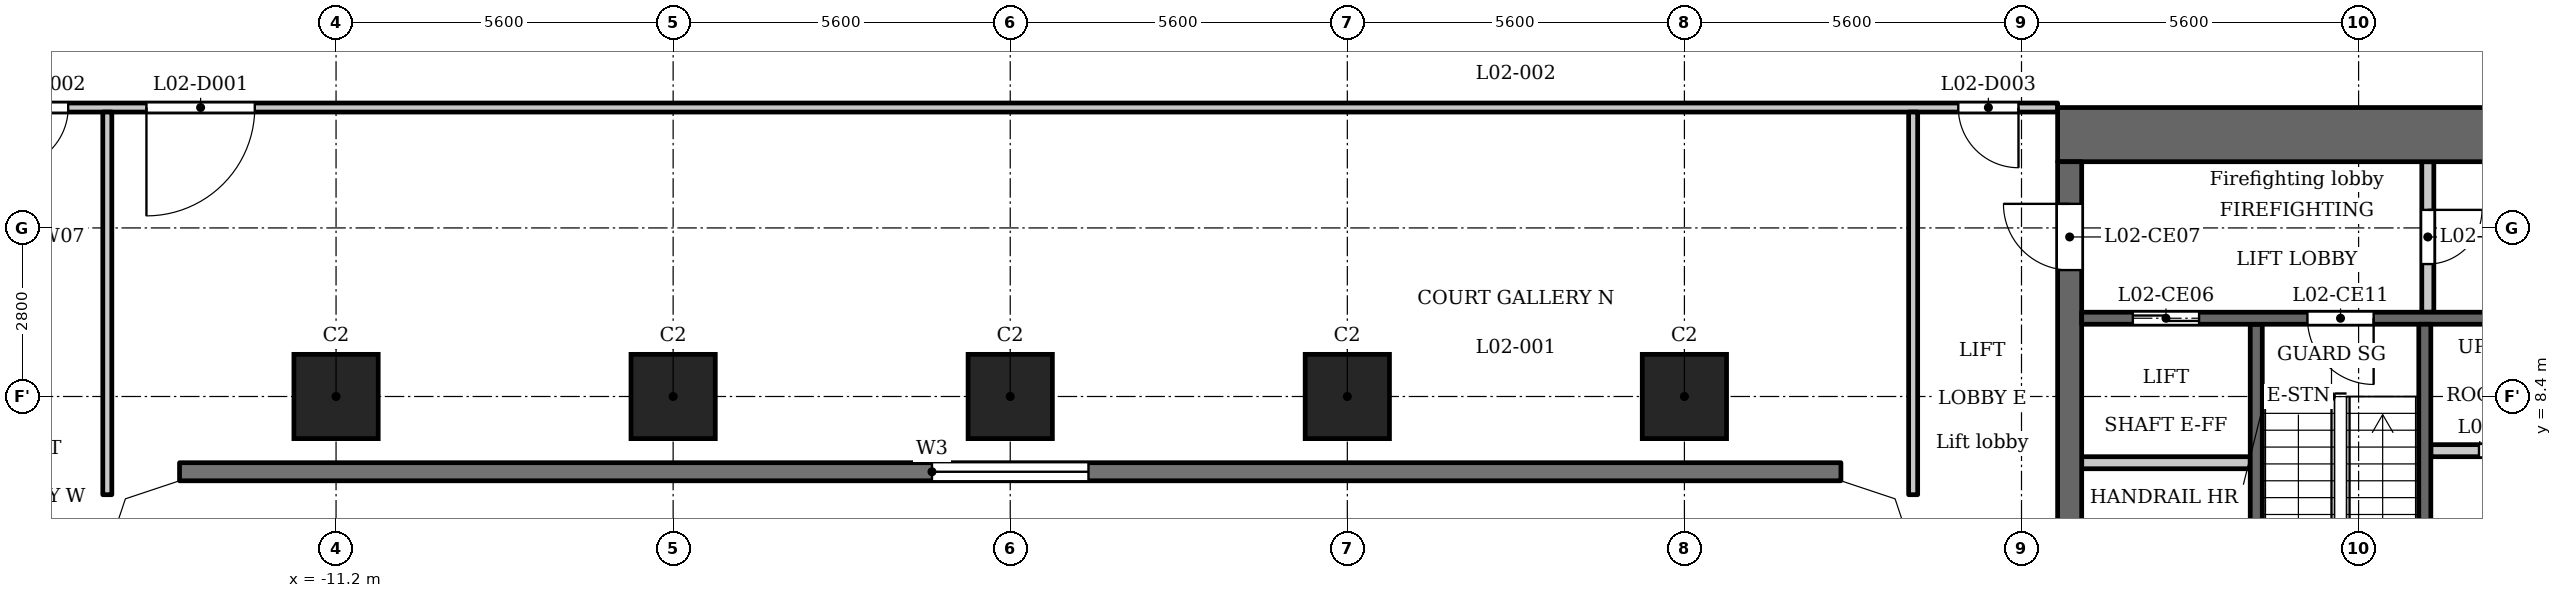
"""IFC4 building model, lengths in metres.
Left out: names, types, materials, properties, quantities, classifications, styles, units other than length and angle.
Written with IfcOpenShell. Run it as: python <this file> out.ifc"""

import sys

from ifc_helpers import new_model, si_unit, direction, frame, frame_2d, origin, origin_2d, place, context, subcontext, project, spatial, polyline, rectangle, outline, extrude, element, fill, save


model = new_model("IFC4")
c1 = context("Model", 3, precision=1e-05, world=origin(), true_north=direction((0.0, 1.0)))
c2 = subcontext(c1, "Body", "Model", "MODEL_VIEW")
j1 = project(units=[si_unit("LENGTHUNIT", "METRE"), si_unit("PLANEANGLEUNIT", "RADIAN")], contexts=[c1])
p1 = place(None, origin())
s1 = spatial("IfcSite", under=j1, at=p1, CompositionType="ELEMENT")
p2 = place(p1, origin())
s2 = spatial("IfcBuilding", under=s1, at=p2, CompositionType="ELEMENT")
p3 = place(p2, frame((0.0, 0.0, 11.3)))
s3 = spatial("IfcBuildingStorey", under=s2, at=p3, CompositionType="ELEMENT", Elevation=11.3)
for number, where, z_axis, x_axis in (
    (1, (-11.2, 8.4, 0.0), (0.0, 0.0, 1.0), (1.0, 0.0, 0.0)),
    (2, (-5.6, 8.4, 0.0), (0.0, 0.0, 1.0), (1.0, 0.0, 0.0)),
    (3, (0.0, 8.4, 0.0), (0.0, 0.0, 1.0), (1.0, 0.0, 0.0)),
    (4, (5.6, 8.4, 0.0), (0.0, 0.0, 1.0), (1.0, 0.0, 0.0)),
    (5, (11.2, 8.4, 0.0), (0.0, 0.0, 1.0), (1.0, 0.0, 0.0)),
):
    element("IfcColumn", number, at=place(p3, frame(where, z_axis=z_axis, x_axis=x_axis)), inside=s3, PredefinedType="COLUMN", context=c2, shape_type="SweptSolid", body=[
        extrude(rectangle(XDim=1.4, YDim=1.4, at=origin_2d()), origin(), (0.0, 0.0, 1.0), 4.8),
    ])
p4 = place(p3, frame((-13.8, 7.15, 0.0), z_axis=(0.0, 0.0, 1.0), x_axis=(1.0, 0.0, 0.0)))
e6 = element("IfcWall", 6, at=p4, inside=s3, PredefinedType="SOLIDWALL", context=c2, shape_type="SweptSolid", body=[
    extrude(rectangle(XDim=27.6, YDim=0.3, at=frame_2d((13.8, 0.0))), origin(), (0.0, 0.0, 1.0), 4.45),
])
p5 = place(p4, frame((12.5, 0.0, 0.9)))
e7 = element("IfcOpeningElement", 7, at=p5, cuts=e6, PredefinedType="OPENING", context=c2, shape_type="SweptSolid", body=[
    extrude(rectangle(XDim=2.6, YDim=1.25, at=frame_2d((1.3, 0.625))), frame((0.0, 0.16, 0.0), z_axis=(0.0, -1.0, 0.0), x_axis=(1.0, 0.0, 0.0)), (0.0, 0.0, 1.0), 0.32),
])
p6 = place(p3, frame((20.7, 2.6, 0.0), z_axis=(0.0, 0.0, 1.0), x_axis=(0.0, 1.0, 0.0)))
e8 = element("IfcWall", 8, at=p6, inside=s3, PredefinedType="SHEAR", context=c2, shape_type="SweptSolid", body=[
    extrude(rectangle(XDim=7.0, YDim=0.2, at=frame_2d((3.5, 0.0))), origin(), (0.0, 0.0, 1.0), 4.45),
])
p7 = place(p3, frame((17.4, 12.75, 0.0), z_axis=(0.0, 0.0, 1.0), x_axis=(1.0, 0.0, 0.0)))
e9 = element("IfcWall", 9, at=p7, inside=s3, PredefinedType="SHEAR", context=c2, shape_type="SweptSolid", body=[
    extrude(rectangle(XDim=10.4, YDim=0.9, at=frame_2d((5.2, 0.0))), origin(), (0.0, 0.0, 1.0), 4.45),
])
p8 = place(p3, frame((17.6, -12.3, 0.0), z_axis=(0.0, 0.0, 1.0), x_axis=(0.0, 1.0, 0.0)))
e10 = element("IfcWall", 10, at=p8, inside=s3, PredefinedType="SHEAR", context=c2, shape_type="SweptSolid", body=[
    extrude(rectangle(XDim=24.6, YDim=0.4, at=frame_2d((12.3, 0.0))), origin(), (0.0, 0.0, 1.0), 4.45),
])
p9 = place(p8, frame((6.0, 0.0, 0.0)))
e11 = element("IfcOpeningElement", 11, at=p9, cuts=e10, PredefinedType="OPENING", context=c2, shape_type="SweptSolid", body=[
    extrude(rectangle(XDim=1.1, YDim=2.1, at=frame_2d((0.55, 1.05))), frame((0.0, 0.21, 0.0), z_axis=(0.0, -1.0, 0.0), x_axis=(1.0, 0.0, 0.0)), (0.0, 0.0, 1.0), 0.42),
])
p10 = place(p8, frame((8.4, 0.0, 0.0)))
e12 = element("IfcOpeningElement", 12, at=p10, cuts=e10, PredefinedType="OPENING", context=c2, shape_type="SweptSolid", body=[
    extrude(rectangle(XDim=1.1, YDim=2.1, at=frame_2d((0.55, 1.05))), frame((0.0, 0.21, 0.0), z_axis=(0.0, -1.0, 0.0), x_axis=(1.0, 0.0, 0.0)), (0.0, 0.0, 1.0), 0.42),
])
p11 = place(p8, frame((10.8, 0.0, 0.0)))
e13 = element("IfcOpeningElement", 13, at=p11, cuts=e10, PredefinedType="OPENING", context=c2, shape_type="SweptSolid", body=[
    extrude(rectangle(XDim=1.1, YDim=2.1, at=frame_2d((0.55, 1.05))), frame((0.0, 0.21, 0.0), z_axis=(0.0, -1.0, 0.0), x_axis=(1.0, 0.0, 0.0)), (0.0, 0.0, 1.0), 0.42),
])
p12 = place(p8, frame((16.75, 0.0, 0.0)))
e14 = element("IfcOpeningElement", 14, at=p12, cuts=e10, PredefinedType="OPENING", context=c2, shape_type="SweptSolid", body=[
    extrude(rectangle(XDim=0.9, YDim=2.1, at=frame_2d((0.45, 1.05))), frame((0.0, 0.21, 0.0), z_axis=(0.0, -1.0, 0.0), x_axis=(1.0, 0.0, 0.0)), (0.0, 0.0, 1.0), 0.42),
])
p13 = place(p8, frame((22.8, 0.0, 0.0)))
e15 = element("IfcOpeningElement", 15, at=p13, cuts=e10, PredefinedType="OPENING", context=c2, shape_type="SweptSolid", body=[
    extrude(rectangle(XDim=1.1, YDim=2.1, at=frame_2d((0.55, 1.05))), frame((0.0, 0.21, 0.0), z_axis=(0.0, -1.0, 0.0), x_axis=(1.0, 0.0, 0.0)), (0.0, 0.0, 1.0), 0.42),
])
p14 = place(p8, frame((0.7, 0.0, 0.0)))
e16 = element("IfcOpeningElement", 16, at=p14, cuts=e10, PredefinedType="OPENING", context=c2, shape_type="SweptSolid", body=[
    extrude(rectangle(XDim=1.1, YDim=2.1, at=frame_2d((0.55, 1.05))), frame((0.0, 0.21, 0.0), z_axis=(0.0, -1.0, 0.0), x_axis=(1.0, 0.0, 0.0)), (0.0, 0.0, 1.0), 0.42),
])
p15 = place(p8, frame((12.775, 0.0, 0.0)))
e17 = element("IfcOpeningElement", 17, at=p15, cuts=e10, PredefinedType="OPENING", context=c2, shape_type="SweptSolid", body=[
    extrude(rectangle(XDim=1.8, YDim=2.1, at=frame_2d((0.9, 1.05))), frame((0.0, 0.21, 0.0), z_axis=(0.0, -1.0, 0.0), x_axis=(1.0, 0.0, 0.0)), (0.0, 0.0, 1.0), 0.42),
])
p16 = place(p3, frame((23.55, 9.8, 0.0), z_axis=(0.0, 0.0, 1.0), x_axis=(0.0, 1.0, 0.0)))
e18 = element("IfcWall", 18, at=p16, inside=s3, PredefinedType="PARTITIONING", context=c2, shape_type="SweptSolid", body=[
    extrude(rectangle(XDim=2.5, YDim=0.2, at=frame_2d((1.25, 0.0))), origin(), (0.0, 0.0, 1.0), 4.45),
])
p17 = place(p16, frame((0.8, 0.0, 0.0)))
e19 = element("IfcOpeningElement", 19, at=p17, cuts=e18, PredefinedType="OPENING", context=c2, shape_type="SweptSolid", body=[
    extrude(rectangle(XDim=0.9, YDim=2.1, at=frame_2d((0.45, 1.05))), frame((0.0, 0.11, 0.0), z_axis=(0.0, -1.0, 0.0), x_axis=(1.0, 0.0, 0.0)), (0.0, 0.0, 1.0), 0.22),
])
p18 = place(p3, frame((23.6, 7.5, 0.0), z_axis=(0.0, 0.0, 1.0), x_axis=(1.0, 0.0, 0.0)))
e20 = element("IfcWall", 20, at=p18, inside=s3, PredefinedType="PARTITIONING", context=c2, shape_type="SweptSolid", body=[
    extrude(rectangle(XDim=2.5, YDim=0.2, at=frame_2d((1.25, 0.0))), origin(), (0.0, 0.0, 1.0), 4.45),
])
p19 = place(p18, frame((0.8, 0.0, 0.0)))
e21 = element("IfcOpeningElement", 21, at=p19, cuts=e20, PredefinedType="OPENING", context=c2, shape_type="SweptSolid", body=[
    extrude(rectangle(XDim=0.9, YDim=2.1, at=frame_2d((0.45, 1.05))), frame((0.0, 0.11, 0.0), z_axis=(0.0, -1.0, 0.0), x_axis=(1.0, 0.0, 0.0)), (0.0, 0.0, 1.0), 0.22),
])
p20 = place(p3, frame((17.8, 7.3, 0.0), z_axis=(0.0, 0.0, 1.0), x_axis=(1.0, 0.0, 0.0)))
e22 = element("IfcWall", 22, at=p20, inside=s3, PredefinedType="PARTITIONING", context=c2, shape_type="SweptSolid", body=[
    extrude(rectangle(XDim=2.8, YDim=0.2, at=frame_2d((1.4, 0.0))), origin(), (0.0, 0.0, 1.0), 4.45),
])
p21 = place(p3, frame((17.8, 9.7, 0.0), z_axis=(0.0, 0.0, 1.0), x_axis=(1.0, 0.0, 0.0)))
e23 = element("IfcWall", 23, at=p21, inside=s3, PredefinedType="SHEAR", context=c2, shape_type="SweptSolid", body=[
    extrude(rectangle(XDim=8.3, YDim=0.2, at=frame_2d((4.15, 0.0))), origin(), (0.0, 0.0, 1.0), 4.45),
])
p22 = place(p21, frame((0.85, 0.0, 0.0)))
e24 = element("IfcOpeningElement", 24, at=p22, cuts=e23, PredefinedType="OPENING", context=c2, shape_type="SweptSolid", body=[
    extrude(rectangle(XDim=1.1, YDim=2.1, at=frame_2d((0.55, 1.05))), frame((0.0, 0.11, 0.0), z_axis=(0.0, -1.0, 0.0), x_axis=(1.0, 0.0, 0.0)), (0.0, 0.0, 1.0), 0.22),
])
p23 = place(p21, frame((3.75, 0.0, 0.0)))
e25 = element("IfcOpeningElement", 25, at=p23, cuts=e23, PredefinedType="OPENING", context=c2, shape_type="SweptSolid", body=[
    extrude(rectangle(XDim=1.1, YDim=2.1, at=frame_2d((0.55, 1.05))), frame((0.0, 0.11, 0.0), z_axis=(0.0, -1.0, 0.0), x_axis=(1.0, 0.0, 0.0)), (0.0, 0.0, 1.0), 0.22),
])
p24 = place(p3, frame((23.5, 2.6, 0.0), z_axis=(0.0, 0.0, 1.0), x_axis=(0.0, 1.0, 0.0)))
e26 = element("IfcWall", 26, at=p24, inside=s3, PredefinedType="SHEAR", context=c2, shape_type="SweptSolid", body=[
    extrude(rectangle(XDim=7.0, YDim=0.2, at=frame_2d((3.5, 0.0))), origin(), (0.0, 0.0, 1.0), 4.45),
])
p25 = place(p3, frame((-17.4, 13.2, 0.0), z_axis=(0.0, 0.0, 1.0), x_axis=(1.0, 0.0, 0.0)))
e27 = element("IfcWall", 27, at=p25, inside=s3, PredefinedType="PARTITIONING", context=c2, shape_type="SweptSolid", body=[
    extrude(rectangle(XDim=34.8, YDim=0.15, at=frame_2d((17.4, 0.0))), origin(), (0.0, 0.0, 1.0), 4.45),
])
p26 = place(p25, frame((3.05, 0.0, 0.0)))
e28 = element("IfcOpeningElement", 28, at=p26, cuts=e27, PredefinedType="OPENING", context=c2, shape_type="SweptSolid", body=[
    extrude(rectangle(XDim=1.8, YDim=2.1, at=frame_2d((0.9, 1.05))), frame((0.0, 0.085, 0.0), z_axis=(0.0, -1.0, 0.0), x_axis=(1.0, 0.0, 0.0)), (0.0, 0.0, 1.0), 0.17),
])
p27 = place(p25, frame((0.75, 0.0, 0.0)))
e29 = element("IfcOpeningElement", 29, at=p27, cuts=e27, PredefinedType="OPENING", context=c2, shape_type="SweptSolid", body=[
    extrude(rectangle(XDim=1.0, YDim=2.1, at=frame_2d((0.5, 1.05))), frame((0.0, 0.085, 0.0), z_axis=(0.0, -1.0, 0.0), x_axis=(1.0, 0.0, 0.0)), (0.0, 0.0, 1.0), 0.17),
])
p28 = place(p25, frame((33.15, 0.0, 0.0)))
e30 = element("IfcOpeningElement", 30, at=p28, cuts=e27, PredefinedType="OPENING", context=c2, shape_type="SweptSolid", body=[
    extrude(rectangle(XDim=1.0, YDim=2.1, at=frame_2d((0.5, 1.05))), frame((0.0, 0.085, 0.0), z_axis=(0.0, -1.0, 0.0), x_axis=(1.0, 0.0, 0.0)), (0.0, 0.0, 1.0), 0.17),
])
for number, where, z_axis, x_axis in (
    (31, (-15.0, 6.769, 0.0), (0.0, 0.0, 1.0), (0.0, 1.0, 0.0)),
    (32, (15.0, 6.769, 0.0), (0.0, 0.0, 1.0), (0.0, 1.0, 0.0)),
):
    element("IfcWall", number, at=place(p3, frame(where, z_axis=z_axis, x_axis=x_axis)), inside=s3, PredefinedType="PARTITIONING", context=c2, shape_type="SweptSolid", body=[
        extrude(rectangle(XDim=6.356, YDim=0.15, at=frame_2d((3.178, 0.0))), origin(), (0.0, 0.0, 1.0), 4.45),
    ])
p29 = place(p3, origin())
e33 = element("IfcWall", 33, at=p29, inside=s3, PredefinedType="SOLIDWALL", context=c2, shape_type="SweptSolid", body=[
    extrude(outline(polyline([(-13.849, 7.3), (-14.937, 6.937), (-15.3, 5.849), (-15.3, 5.8), (-15.0, 5.8), (-14.7, 6.7), (-13.8, 7.0), (-13.8, 7.3), (-13.849, 7.3)])), origin(), (0.0, 0.0, 1.0), 4.45),
])
e34 = element("IfcWall", 34, at=p29, inside=s3, PredefinedType="SOLIDWALL", context=c2, shape_type="SweptSolid", body=[
    extrude(outline(polyline([(14.937, 6.937), (13.849, 7.3), (13.8, 7.3), (13.8, 7.0), (14.7, 6.7), (15.0, 5.8), (15.3, 5.8), (15.3, 5.849), (14.937, 6.937)])), origin(), (0.0, 0.0, 1.0), 4.45),
])
p30 = place(p22, origin())
e35 = element("IfcDoor", 35, at=p30, inside=s3, OperationType="DOUBLE_DOOR_SLIDING", PredefinedType="DOOR", context=c2, shape_type="SweptSolid", body=[
    extrude(rectangle(XDim=1.1, YDim=2.1, at=frame_2d((0.55, 1.05))), frame((0.0, 0.025, 0.0), z_axis=(0.0, -1.0, 0.0), x_axis=(1.0, 0.0, 0.0)), (0.0, 0.0, 1.0), 0.05),
])
fill(e24, e35)
p31 = place(p13, origin())
e36 = element("IfcDoor", 36, at=p31, inside=s3, OperationType="SINGLE_SWING_LEFT", PredefinedType="DOOR", context=c2, shape_type="SweptSolid", body=[
    extrude(rectangle(XDim=1.1, YDim=2.1, at=frame_2d((0.55, 1.05))), frame((0.0, 0.025, 0.0), z_axis=(0.0, -1.0, 0.0), x_axis=(1.0, 0.0, 0.0)), (0.0, 0.0, 1.0), 0.05),
])
fill(e15, e36)
p32 = place(p17, origin())
e37 = element("IfcDoor", 37, at=p32, inside=s3, OperationType="SINGLE_SWING_RIGHT", PredefinedType="DOOR", context=c2, shape_type="SweptSolid", body=[
    extrude(rectangle(XDim=0.9, YDim=2.1, at=frame_2d((0.45, 1.05))), frame((0.0, 0.025, 0.0), z_axis=(0.0, -1.0, 0.0), x_axis=(1.0, 0.0, 0.0)), (0.0, 0.0, 1.0), 0.05),
])
fill(e19, e37)
p33 = place(p23, origin())
e38 = element("IfcDoor", 38, at=p33, inside=s3, OperationType="SINGLE_SWING_RIGHT", PredefinedType="DOOR", context=c2, shape_type="SweptSolid", body=[
    extrude(rectangle(XDim=1.1, YDim=2.1, at=frame_2d((0.55, 1.05))), frame((0.0, 0.025, 0.0), z_axis=(0.0, -1.0, 0.0), x_axis=(1.0, 0.0, 0.0)), (0.0, 0.0, 1.0), 0.05),
])
fill(e25, e38)
p34 = place(p19, origin())
e39 = element("IfcDoor", 39, at=p34, inside=s3, OperationType="SINGLE_SWING_LEFT", PredefinedType="DOOR", context=c2, shape_type="SweptSolid", body=[
    extrude(rectangle(XDim=0.9, YDim=2.1, at=frame_2d((0.45, 1.05))), frame((0.0, 0.025, 0.0), z_axis=(0.0, -1.0, 0.0), x_axis=(1.0, 0.0, 0.0)), (0.0, 0.0, 1.0), 0.05),
])
fill(e21, e39)
p35 = place(p26, origin())
e40 = element("IfcDoor", 40, at=p35, inside=s3, OperationType="SINGLE_SWING_LEFT", PredefinedType="DOOR", context=c2, shape_type="SweptSolid", body=[
    extrude(rectangle(XDim=1.8, YDim=2.1, at=frame_2d((0.9, 1.05))), frame((0.0, 0.025, 0.0), z_axis=(0.0, -1.0, 0.0), x_axis=(1.0, 0.0, 0.0)), (0.0, 0.0, 1.0), 0.05),
])
fill(e28, e40)
p36 = place(p27, origin())
e41 = element("IfcDoor", 41, at=p36, inside=s3, OperationType="SINGLE_SWING_LEFT", PredefinedType="DOOR", context=c2, shape_type="SweptSolid", body=[
    extrude(rectangle(XDim=1.0, YDim=2.1, at=frame_2d((0.5, 1.05))), frame((0.0, 0.025, 0.0), z_axis=(0.0, -1.0, 0.0), x_axis=(1.0, 0.0, 0.0)), (0.0, 0.0, 1.0), 0.05),
])
fill(e29, e41)
p37 = place(p28, origin())
e42 = element("IfcDoor", 42, at=p37, inside=s3, OperationType="SINGLE_SWING_RIGHT", PredefinedType="DOOR", context=c2, shape_type="SweptSolid", body=[
    extrude(rectangle(XDim=1.0, YDim=2.1, at=frame_2d((0.5, 1.05))), frame((0.0, 0.025, 0.0), z_axis=(0.0, -1.0, 0.0), x_axis=(1.0, 0.0, 0.0)), (0.0, 0.0, 1.0), 0.05),
])
fill(e30, e42)
p38 = place(p5, origin())
e43 = element("IfcWindow", 43, at=p38, inside=s3, PartitioningType="SINGLE_PANEL", PredefinedType="WINDOW", context=c2, shape_type="SweptSolid", body=[
    extrude(rectangle(XDim=2.6, YDim=1.25, at=frame_2d((1.3, 0.625))), frame((0.0, 0.03, 0.0), z_axis=(0.0, -1.0, 0.0), x_axis=(1.0, 0.0, 0.0)), (0.0, 0.0, 1.0), 0.06),
])
fill(e7, e43)
save(model, sys.argv[1])
